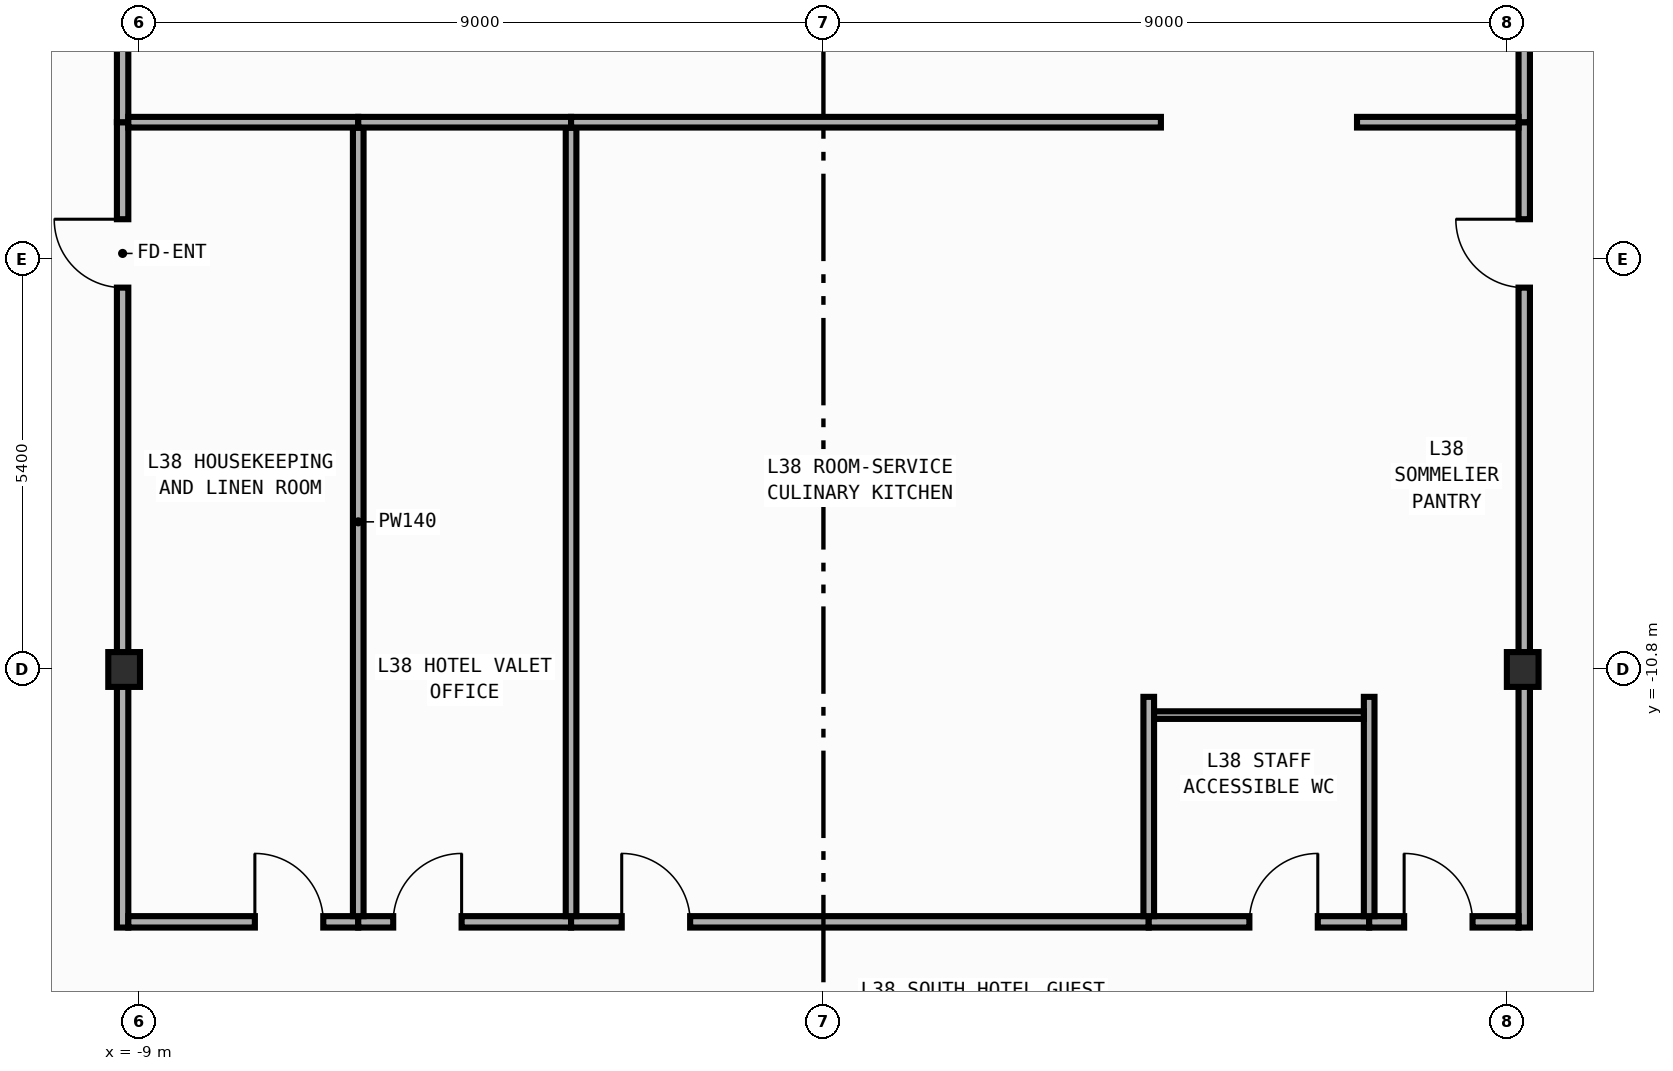
"""IFC4 building model, lengths in metres.
Left out: names, types, materials, properties, quantities, classifications, styles, units other than length and angle.
Written with IfcOpenShell. Run it as: python <this file> out.ifc"""

import sys

from ifc_helpers import new_model, si_unit, direction, frame, frame_2d, origin, origin_2d, place, context, subcontext, project, spatial, rectangle, i_section, extrude, element, fill, save


model = new_model("IFC4")
c1 = context("Model", 3, precision=1e-05, world=origin(), true_north=direction((0.0, 1.0)))
c2 = subcontext(c1, "Body", "Model", "MODEL_VIEW")
j1 = project(units=[si_unit("LENGTHUNIT", "METRE"), si_unit("PLANEANGLEUNIT", "RADIAN")], contexts=[c1])
p1 = place(None, origin())
s1 = spatial("IfcSite", under=j1, at=p1, CompositionType="ELEMENT")
p2 = place(p1, origin())
s2 = spatial("IfcBuilding", under=s1, at=p2, CompositionType="ELEMENT")
p3 = place(p2, frame((0.0, 0.0, 168.8)))
s3 = spatial("IfcBuildingStorey", under=s2, at=p3, CompositionType="ELEMENT", Elevation=168.8)
for number, where, z_axis, x_axis in (
    (1, (-9.2, -10.8, 0.0), (0.0, 0.0, 1.0), (1.0, 0.0, 0.0)),
    (2, (9.2, -10.8, 0.0), (0.0, 0.0, 1.0), (1.0, 0.0, 0.0)),
):
    element("IfcColumn", number, at=place(p3, frame(where, z_axis=z_axis, x_axis=x_axis)), inside=s3, PredefinedType="COLUMN", context=c2, shape_type="SweptSolid", body=[
        extrude(i_section(OverallWidth=0.417, OverallDepth=0.458, WebThickness=0.03, FlangeThickness=0.05, FilletRadius=0.022, at=origin_2d()), origin(), (0.0, 0.0, 1.0), 3.8),
    ])
p4 = place(p3, frame((-9.22, -14.195, 0.0), z_axis=(0.0, 0.0, 1.0), x_axis=(0.0, 1.0, 0.0)))
e3 = element("IfcWall", 3, at=p4, inside=s3, PredefinedType="PARTITIONING", context=c2, shape_type="SweptSolid", body=[
    extrude(rectangle(XDim=10.595, YDim=0.15, at=frame_2d((5.297, 0.0))), origin(), (0.0, 0.0, 1.0), 2.952),
])
p5 = place(p4, frame((8.419, 0.0, 0.0)))
e4 = element("IfcOpeningElement", 4, at=p5, cuts=e3, PredefinedType="OPENING", context=c2, shape_type="SweptSolid", body=[
    extrude(rectangle(XDim=0.9, YDim=2.15, at=frame_2d((0.45, 1.075))), frame((0.0, 0.085, 0.0), z_axis=(0.0, -1.0, 0.0), x_axis=(1.0, 0.0, 0.0)), (0.0, 0.0, 1.0), 0.17),
])
p6 = place(p3, frame((-9.22, -3.6, 0.0), z_axis=(0.0, 0.0, 1.0), x_axis=(0.0, 1.0, 0.0)))
e5 = element("IfcWall", 5, at=p6, inside=s3, PredefinedType="PARTITIONING", context=c2, shape_type="SweptSolid", body=[
    extrude(rectangle(XDim=19.195, YDim=0.15, at=frame_2d((9.598, 0.0))), origin(), (0.0, 0.0, 1.0), 2.952),
])
p7 = place(p6, frame((8.542, 0.0, 0.0)))
e6 = element("IfcOpeningElement", 6, at=p7, cuts=e5, PredefinedType="OPENING", context=c2, shape_type="SweptSolid", body=[
    extrude(rectangle(XDim=0.9, YDim=2.15, at=frame_2d((0.45, 1.075))), frame((0.0, 0.085, 0.0), z_axis=(0.0, -1.0, 0.0), x_axis=(1.0, 0.0, 0.0)), (0.0, 0.0, 1.0), 0.17),
])
p8 = place(p3, frame((9.22, -14.195, 0.0), z_axis=(0.0, 0.0, 1.0), x_axis=(0.0, 1.0, 0.0)))
e7 = element("IfcWall", 7, at=p8, inside=s3, PredefinedType="PARTITIONING", context=c2, shape_type="SweptSolid", body=[
    extrude(rectangle(XDim=10.595, YDim=0.15, at=frame_2d((5.297, 0.0))), origin(), (0.0, 0.0, 1.0), 2.952),
])
p9 = place(p8, frame((8.419, 0.0, 0.0)))
e8 = element("IfcOpeningElement", 8, at=p9, cuts=e7, PredefinedType="OPENING", context=c2, shape_type="SweptSolid", body=[
    extrude(rectangle(XDim=0.9, YDim=2.15, at=frame_2d((0.45, 1.075))), frame((0.0, 0.085, 0.0), z_axis=(0.0, -1.0, 0.0), x_axis=(1.0, 0.0, 0.0)), (0.0, 0.0, 1.0), 0.17),
])
p10 = place(p3, frame((9.22, -3.6, 0.0), z_axis=(0.0, 0.0, 1.0), x_axis=(0.0, 1.0, 0.0)))
e9 = element("IfcWall", 9, at=p10, inside=s3, PredefinedType="PARTITIONING", context=c2, shape_type="SweptSolid", body=[
    extrude(rectangle(XDim=19.195, YDim=0.15, at=frame_2d((9.598, 0.0))), origin(), (0.0, 0.0, 1.0), 2.952),
])
p11 = place(p10, frame((8.542, 0.0, 0.0)))
e10 = element("IfcOpeningElement", 10, at=p11, cuts=e9, PredefinedType="OPENING", context=c2, shape_type="SweptSolid", body=[
    extrude(rectangle(XDim=0.9, YDim=2.15, at=frame_2d((0.45, 1.075))), frame((0.0, 0.085, 0.0), z_axis=(0.0, -1.0, 0.0), x_axis=(1.0, 0.0, 0.0)), (0.0, 0.0, 1.0), 0.17),
])
p12 = place(p3, frame((-9.145, -14.12, 0.0), z_axis=(0.0, 0.0, 1.0), x_axis=(1.0, 0.0, 0.0)))
e11 = element("IfcWall", 11, at=p12, inside=s3, PredefinedType="PARTITIONING", context=c2, shape_type="SweptSolid", body=[
    extrude(rectangle(XDim=3.025, YDim=0.15, at=frame_2d((1.512, 0.0))), origin(), (0.0, 0.0, 1.0), 3.54),
])
p13 = place(p12, frame((1.665, 0.0, 0.0)))
e12 = element("IfcOpeningElement", 12, at=p13, cuts=e11, PredefinedType="OPENING", context=c2, shape_type="SweptSolid", body=[
    extrude(rectangle(XDim=0.9, YDim=2.15, at=frame_2d((0.45, 1.075))), frame((0.0, 0.085, 0.0), z_axis=(0.0, -1.0, 0.0), x_axis=(1.0, 0.0, 0.0)), (0.0, 0.0, 1.0), 0.17),
])
p14 = place(p3, frame((-6.12, -14.12, 0.0), z_axis=(0.0, 0.0, 1.0), x_axis=(1.0, 0.0, 0.0)))
e13 = element("IfcWall", 13, at=p14, inside=s3, PredefinedType="PARTITIONING", context=c2, shape_type="SweptSolid", body=[
    extrude(rectangle(XDim=2.8, YDim=0.15, at=frame_2d((1.4, 0.0))), origin(), (0.0, 0.0, 1.0), 3.54),
])
p15 = place(p14, frame((0.46, 0.0, 0.0)))
e14 = element("IfcOpeningElement", 14, at=p15, cuts=e13, PredefinedType="OPENING", context=c2, shape_type="SweptSolid", body=[
    extrude(rectangle(XDim=0.9, YDim=2.15, at=frame_2d((0.45, 1.075))), frame((0.0, 0.085, 0.0), z_axis=(0.0, -1.0, 0.0), x_axis=(1.0, 0.0, 0.0)), (0.0, 0.0, 1.0), 0.17),
])
p16 = place(p3, frame((-3.32, -14.12, 0.0), z_axis=(0.0, 0.0, 1.0), x_axis=(1.0, 0.0, 0.0)))
e15 = element("IfcWall", 15, at=p16, inside=s3, PredefinedType="PARTITIONING", context=c2, shape_type="SweptSolid", body=[
    extrude(rectangle(XDim=7.6, YDim=0.15, at=frame_2d((3.8, 0.0))), origin(), (0.0, 0.0, 1.0), 3.54),
])
p17 = place(p16, frame((0.667, 0.0, 0.0)))
e16 = element("IfcOpeningElement", 16, at=p17, cuts=e15, PredefinedType="OPENING", context=c2, shape_type="SweptSolid", body=[
    extrude(rectangle(XDim=0.9, YDim=2.15, at=frame_2d((0.45, 1.075))), frame((0.0, 0.085, 0.0), z_axis=(0.0, -1.0, 0.0), x_axis=(1.0, 0.0, 0.0)), (0.0, 0.0, 1.0), 0.17),
])
p18 = place(p3, frame((4.28, -14.12, 0.0), z_axis=(0.0, 0.0, 1.0), x_axis=(1.0, 0.0, 0.0)))
e17 = element("IfcWall", 17, at=p18, inside=s3, PredefinedType="PARTITIONING", context=c2, shape_type="SweptSolid", body=[
    extrude(rectangle(XDim=2.9, YDim=0.15, at=frame_2d((1.45, 0.0))), origin(), (0.0, 0.0, 1.0), 3.54),
])
p19 = place(p18, frame((1.324, 0.0, 0.0)))
e18 = element("IfcOpeningElement", 18, at=p19, cuts=e17, PredefinedType="OPENING", context=c2, shape_type="SweptSolid", body=[
    extrude(rectangle(XDim=0.9, YDim=2.15, at=frame_2d((0.45, 1.075))), frame((0.0, 0.085, 0.0), z_axis=(0.0, -1.0, 0.0), x_axis=(1.0, 0.0, 0.0)), (0.0, 0.0, 1.0), 0.17),
])
p20 = place(p3, frame((7.18, -14.12, 0.0), z_axis=(0.0, 0.0, 1.0), x_axis=(1.0, 0.0, 0.0)))
e19 = element("IfcWall", 19, at=p20, inside=s3, PredefinedType="PARTITIONING", context=c2, shape_type="SweptSolid", body=[
    extrude(rectangle(XDim=1.965, YDim=0.15, at=frame_2d((0.982, 0.0))), origin(), (0.0, 0.0, 1.0), 3.54),
])
p21 = place(p20, frame((0.46, 0.0, 0.0)))
e20 = element("IfcOpeningElement", 20, at=p21, cuts=e19, PredefinedType="OPENING", context=c2, shape_type="SweptSolid", body=[
    extrude(rectangle(XDim=0.9, YDim=2.15, at=frame_2d((0.45, 1.075))), frame((0.0, 0.085, 0.0), z_axis=(0.0, -1.0, 0.0), x_axis=(1.0, 0.0, 0.0)), (0.0, 0.0, 1.0), 0.17),
])
p22 = place(p3, frame((-6.12, -14.045, 0.0), z_axis=(0.0, 0.0, 1.0), x_axis=(0.0, 1.0, 0.0)))
e21 = element("IfcWall", 21, at=p22, inside=s3, PredefinedType="PARTITIONING", context=c2, shape_type="SweptSolid", body=[
    extrude(rectangle(XDim=10.375, YDim=0.14, at=frame_2d((5.188, 0.0))), origin(), (0.0, 0.0, 1.0), 3.54),
])
p23 = place(p3, frame((-9.145, -3.6, 0.0), z_axis=(0.0, 0.0, 1.0), x_axis=(1.0, 0.0, 0.0)))
e22 = element("IfcWall", 22, at=p23, inside=s3, PredefinedType="PARTITIONING", context=c2, shape_type="SweptSolid", body=[
    extrude(rectangle(XDim=3.025, YDim=0.14, at=frame_2d((1.512, 0.0))), origin(), (0.0, 0.0, 1.0), 3.54),
])
p24 = place(p3, frame((-3.32, -14.045, 0.0), z_axis=(0.0, 0.0, 1.0), x_axis=(0.0, 1.0, 0.0)))
e23 = element("IfcWall", 23, at=p24, inside=s3, PredefinedType="PARTITIONING", context=c2, shape_type="SweptSolid", body=[
    extrude(rectangle(XDim=10.375, YDim=0.14, at=frame_2d((5.188, 0.0))), origin(), (0.0, 0.0, 1.0), 3.54),
])
p25 = place(p3, frame((-6.12, -3.6, 0.0), z_axis=(0.0, 0.0, 1.0), x_axis=(1.0, 0.0, 0.0)))
e24 = element("IfcWall", 24, at=p25, inside=s3, PredefinedType="PARTITIONING", context=c2, shape_type="SweptSolid", body=[
    extrude(rectangle(XDim=2.8, YDim=0.14, at=frame_2d((1.4, 0.0))), origin(), (0.0, 0.0, 1.0), 3.54),
])
p26 = place(p3, frame((4.28, -14.045, 0.0), z_axis=(0.0, 0.0, 1.0), x_axis=(0.0, 1.0, 0.0)))
e25 = element("IfcWall", 25, at=p26, inside=s3, PredefinedType="PARTITIONING", context=c2, shape_type="SweptSolid", body=[
    extrude(rectangle(XDim=2.885, YDim=0.14, at=frame_2d((1.442, 0.0))), origin(), (0.0, 0.0, 1.0), 3.54),
])
p27 = place(p3, frame((-3.32, -3.6, 0.0), z_axis=(0.0, 0.0, 1.0), x_axis=(1.0, 0.0, 0.0)))
e26 = element("IfcWall", 26, at=p27, inside=s3, PredefinedType="PARTITIONING", context=c2, shape_type="SweptSolid", body=[
    extrude(rectangle(XDim=7.76, YDim=0.14, at=frame_2d((3.88, 0.0))), origin(), (0.0, 0.0, 1.0), 3.54),
])
p28 = place(p3, frame((7.18, -14.045, 0.0), z_axis=(0.0, 0.0, 1.0), x_axis=(0.0, 1.0, 0.0)))
e27 = element("IfcWall", 27, at=p28, inside=s3, PredefinedType="PARTITIONING", context=c2, shape_type="SweptSolid", body=[
    extrude(rectangle(XDim=2.885, YDim=0.14, at=frame_2d((1.442, 0.0))), origin(), (0.0, 0.0, 1.0), 3.54),
])
p29 = place(p3, frame((7.02, -3.6, 0.0), z_axis=(0.0, 0.0, 1.0), x_axis=(1.0, 0.0, 0.0)))
e28 = element("IfcWall", 28, at=p29, inside=s3, PredefinedType="PARTITIONING", context=c2, shape_type="SweptSolid", body=[
    extrude(rectangle(XDim=2.125, YDim=0.14, at=frame_2d((1.062, 0.0))), origin(), (0.0, 0.0, 1.0), 3.54),
])
p30 = place(p3, frame((4.35, -11.4, 0.0), z_axis=(0.0, 0.0, 1.0), x_axis=(1.0, 0.0, 0.0)))
e29 = element("IfcWall", 29, at=p30, inside=s3, PredefinedType="PARTITIONING", context=c2, shape_type="SweptSolid", body=[
    extrude(rectangle(XDim=2.76, YDim=0.1, at=frame_2d((1.38, 0.0))), origin(), (0.0, 0.0, 1.0), 3.54),
])
p31 = place(p5, origin())
e30 = element("IfcDoor", 30, at=p31, inside=s3, OperationType="SINGLE_SWING_RIGHT", PredefinedType="DOOR", context=c2, shape_type="SweptSolid", body=[
    extrude(rectangle(XDim=0.9, YDim=2.15, at=frame_2d((0.45, 1.075))), frame((0.0, 0.025, 0.0), z_axis=(0.0, -1.0, 0.0), x_axis=(1.0, 0.0, 0.0)), (0.0, 0.0, 1.0), 0.05),
])
fill(e4, e30)
p32 = place(p9, origin())
e31 = element("IfcDoor", 31, at=p32, inside=s3, OperationType="SINGLE_SWING_RIGHT", PredefinedType="DOOR", context=c2, shape_type="SweptSolid", body=[
    extrude(rectangle(XDim=0.9, YDim=2.15, at=frame_2d((0.45, 1.075))), frame((0.0, 0.025, 0.0), z_axis=(0.0, -1.0, 0.0), x_axis=(1.0, 0.0, 0.0)), (0.0, 0.0, 1.0), 0.05),
])
fill(e8, e31)
p33 = place(p13, origin())
e32 = element("IfcDoor", 32, at=p33, inside=s3, OperationType="SINGLE_SWING_LEFT", PredefinedType="DOOR", context=c2, shape_type="SweptSolid", body=[
    extrude(rectangle(XDim=0.9, YDim=2.15, at=frame_2d((0.45, 1.075))), frame((0.0, 0.025, 0.0), z_axis=(0.0, -1.0, 0.0), x_axis=(1.0, 0.0, 0.0)), (0.0, 0.0, 1.0), 0.05),
])
fill(e12, e32)
p34 = place(p15, origin())
e33 = element("IfcDoor", 33, at=p34, inside=s3, OperationType="SINGLE_SWING_RIGHT", PredefinedType="DOOR", context=c2, shape_type="SweptSolid", body=[
    extrude(rectangle(XDim=0.9, YDim=2.15, at=frame_2d((0.45, 1.075))), frame((0.0, 0.025, 0.0), z_axis=(0.0, -1.0, 0.0), x_axis=(1.0, 0.0, 0.0)), (0.0, 0.0, 1.0), 0.05),
])
fill(e14, e33)
p35 = place(p17, origin())
e34 = element("IfcDoor", 34, at=p35, inside=s3, OperationType="SINGLE_SWING_LEFT", PredefinedType="DOOR", context=c2, shape_type="SweptSolid", body=[
    extrude(rectangle(XDim=0.9, YDim=2.15, at=frame_2d((0.45, 1.075))), frame((0.0, 0.025, 0.0), z_axis=(0.0, -1.0, 0.0), x_axis=(1.0, 0.0, 0.0)), (0.0, 0.0, 1.0), 0.05),
])
fill(e16, e34)
p36 = place(p19, origin())
e35 = element("IfcDoor", 35, at=p36, inside=s3, OperationType="SINGLE_SWING_RIGHT", PredefinedType="DOOR", context=c2, shape_type="SweptSolid", body=[
    extrude(rectangle(XDim=0.9, YDim=2.15, at=frame_2d((0.45, 1.075))), frame((0.0, 0.025, 0.0), z_axis=(0.0, -1.0, 0.0), x_axis=(1.0, 0.0, 0.0)), (0.0, 0.0, 1.0), 0.05),
])
fill(e18, e35)
p37 = place(p21, origin())
e36 = element("IfcDoor", 36, at=p37, inside=s3, OperationType="SINGLE_SWING_LEFT", PredefinedType="DOOR", context=c2, shape_type="SweptSolid", body=[
    extrude(rectangle(XDim=0.9, YDim=2.15, at=frame_2d((0.45, 1.075))), frame((0.0, 0.025, 0.0), z_axis=(0.0, -1.0, 0.0), x_axis=(1.0, 0.0, 0.0)), (0.0, 0.0, 1.0), 0.05),
])
fill(e20, e36)
save(model, sys.argv[1])
